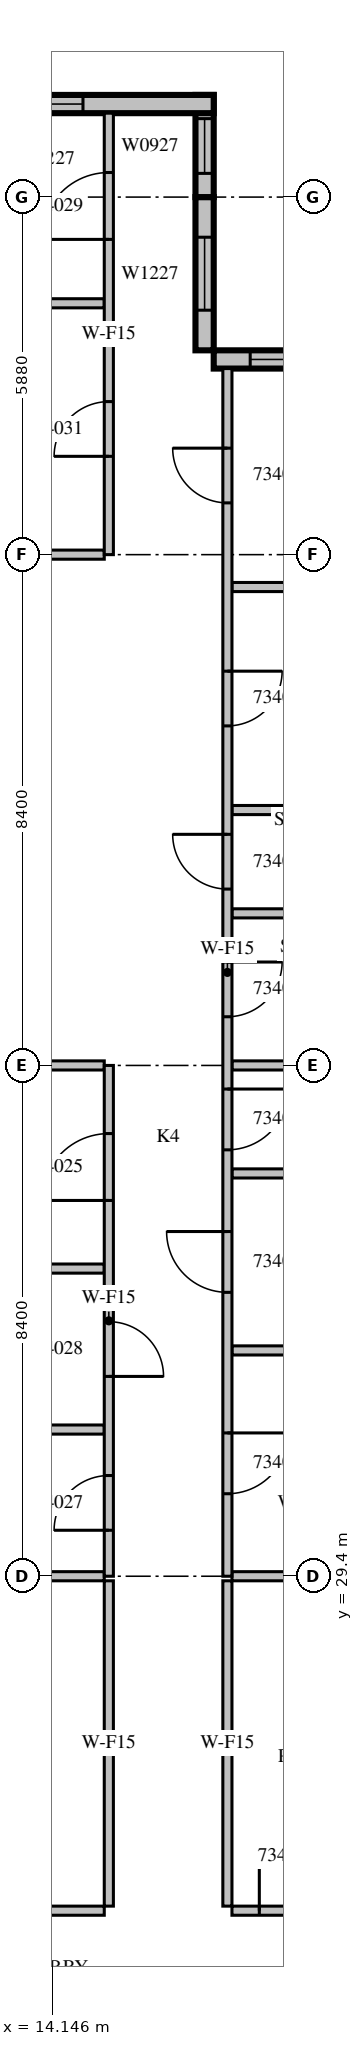
"""IFC4 building model, lengths in metres.
Left out: names, types, materials, properties, quantities, classifications, styles, units other than length and angle.
Written with IfcOpenShell. Run it as: python <this file> out.ifc"""

import sys

from ifc_helpers import new_model, si_unit, direction, frame, frame_2d, origin, place, context, subcontext, project, spatial, rectangle, extrude, source, transform, mapped, element, fill, save


model = new_model("IFC4")
c1 = context("Model", 3, precision=1e-05, world=origin(), true_north=direction((0.0, 1.0)))
c2 = subcontext(c1, "Body", "Model", "MODEL_VIEW")
j1 = project(units=[si_unit("LENGTHUNIT", "METRE"), si_unit("PLANEANGLEUNIT", "RADIAN")], contexts=[c1])
p1 = place(None, origin())
s1 = spatial("IfcSite", under=j1, at=p1, CompositionType="ELEMENT")
p2 = place(p1, origin())
s2 = spatial("IfcBuilding", under=s1, at=p2, CompositionType="ELEMENT")
p3 = place(p2, frame((0.0, 0.0, 153.9)))
s3 = spatial("IfcBuildingStorey", under=s2, at=p3, CompositionType="ELEMENT", Elevation=153.9)
m1 = source(origin(), c2, "Body", "SweptSolid", [
    extrude(rectangle(XDim=4.2, YDim=0.3, at=frame_2d((2.1, 0.0))), origin(), (0.0, 0.0, 1.0), 3.8),
])
p4 = place(p3, frame((21.0, 49.41, 0.0), z_axis=(0.0, 0.0, 1.0), x_axis=(-1.0, 0.0, 0.0)))
e1 = element("IfcWall", 1, at=p4, inside=s3, PredefinedType="STANDARD", context=c2, shape_type="MappedRepresentation", body=[
    mapped(m1, transform((0.0, 0.0, 0.0), scale=1.0)),
])
m2 = source(origin(), c2, "Body", "SweptSolid", [
    extrude(rectangle(XDim=3.0, YDim=2.7, at=frame_2d((1.5, 1.35))), frame((0.0, 0.16, 0.0), z_axis=(0.0, -1.0, 0.0), x_axis=(1.0, 0.0, 0.0)), (0.0, 0.0, 1.0), 0.32),
])
p5 = place(p4, frame((0.6, 0.0, 0.6)))
e2 = element("IfcOpeningElement", 2, at=p5, cuts=e1, PredefinedType="OPENING", context=c2, shape_type="MappedRepresentation", body=[
    mapped(m2, transform((0.0, 0.0, 0.0), scale=1.0)),
])
m3 = source(origin(), c2, "Body", "SweptSolid", [
    extrude(rectangle(XDim=2.52, YDim=0.3, at=frame_2d((1.26, 0.0))), origin(), (0.0, 0.0, 1.0), 3.8),
])
p6 = place(p3, frame((16.65, 49.56, 0.0), z_axis=(0.0, 0.0, 1.0), x_axis=(0.0, 1.0, 0.0)))
e3 = element("IfcWall", 3, at=p6, inside=s3, PredefinedType="STANDARD", context=c2, shape_type="MappedRepresentation", body=[
    mapped(m3, transform((0.0, 0.0, 0.0), scale=1.0)),
])
m4 = source(origin(), c2, "Body", "SweptSolid", [
    extrude(rectangle(XDim=1.2, YDim=2.7, at=frame_2d((0.6, 1.35))), frame((0.0, 0.16, 0.0), z_axis=(0.0, -1.0, 0.0), x_axis=(1.0, 0.0, 0.0)), (0.0, 0.0, 1.0), 0.32),
])
p7 = place(p6, frame((0.66, 0.0, 0.6)))
e4 = element("IfcOpeningElement", 4, at=p7, cuts=e3, PredefinedType="OPENING", context=c2, shape_type="MappedRepresentation", body=[
    mapped(m4, transform((0.0, 0.0, 0.0), scale=1.0)),
])
m5 = source(origin(), c2, "Body", "SweptSolid", [
    extrude(rectangle(XDim=1.68, YDim=0.3, at=frame_2d((0.84, 0.0))), origin(), (0.0, 0.0, 1.0), 3.8),
])
p8 = place(p3, frame((16.65, 52.08, 0.0), z_axis=(0.0, 0.0, 1.0), x_axis=(0.0, 1.0, 0.0)))
e5 = element("IfcWall", 5, at=p8, inside=s3, PredefinedType="STANDARD", context=c2, shape_type="MappedRepresentation", body=[
    mapped(m5, transform((0.0, 0.0, 0.0), scale=1.0)),
])
m6 = source(origin(), c2, "Body", "SweptSolid", [
    extrude(rectangle(XDim=0.9, YDim=2.7, at=frame_2d((0.45, 1.35))), frame((0.0, 0.16, 0.0), z_axis=(0.0, -1.0, 0.0), x_axis=(1.0, 0.0, 0.0)), (0.0, 0.0, 1.0), 0.32),
])
p9 = place(p8, frame((0.39, 0.0, 0.6)))
e6 = element("IfcOpeningElement", 6, at=p9, cuts=e5, PredefinedType="OPENING", context=c2, shape_type="MappedRepresentation", body=[
    mapped(m6, transform((0.0, 0.0, 0.0), scale=1.0)),
])
m7 = source(origin(), c2, "Body", "SweptSolid", [
    extrude(rectangle(XDim=10.5, YDim=0.3, at=frame_2d((5.25, 0.0))), origin(), (0.0, 0.0, 1.0), 3.8),
])
p10 = place(p3, frame((16.8, 53.61, 0.0), z_axis=(0.0, 0.0, 1.0), x_axis=(-1.0, 0.0, 0.0)))
e7 = element("IfcWall", 7, at=p10, inside=s3, PredefinedType="STANDARD", context=c2, shape_type="MappedRepresentation", body=[
    mapped(m7, transform((0.0, 0.0, 0.0), scale=1.0)),
])
p11 = place(p10, frame((2.15, 0.0, 0.6)))
e8 = element("IfcOpeningElement", 8, at=p11, cuts=e7, PredefinedType="OPENING", context=c2, shape_type="MappedRepresentation", body=[
    mapped(m4, transform((0.0, 0.0, 0.0), scale=1.0)),
])
m8 = source(origin(), c2, "Body", "SweptSolid", [
    extrude(rectangle(XDim=1.8, YDim=2.7, at=frame_2d((0.9, 1.35))), frame((0.0, 0.16, 0.0), z_axis=(0.0, -1.0, 0.0), x_axis=(1.0, 0.0, 0.0)), (0.0, 0.0, 1.0), 0.32),
])
p12 = place(p10, frame((8.025, 0.0, 0.6)))
e9 = element("IfcOpeningElement", 9, at=p12, cuts=e7, PredefinedType="OPENING", context=c2, shape_type="MappedRepresentation", body=[
    mapped(m8, transform((0.0, 0.0, 0.0), scale=1.0)),
])
m9 = source(origin(), c2, "Body", "SweptSolid", [
    extrude(rectangle(XDim=8.495, YDim=0.15, at=frame_2d((4.247, 0.0))), origin(), (0.0, 0.0, 1.0), 3.8),
])
p13 = place(p3, frame((6.505, 23.9, 0.0), z_axis=(0.0, 0.0, 1.0), x_axis=(1.0, 0.0, 0.0)))
e10 = element("IfcWall", 10, at=p13, inside=s3, PredefinedType="PARTITIONING", context=c2, shape_type="MappedRepresentation", body=[
    mapped(m9, transform((0.0, 0.0, 0.0), scale=1.0)),
])
m10 = source(origin(), c2, "Body", "SweptSolid", [
    extrude(rectangle(XDim=0.9, YDim=2.1, at=frame_2d((0.45, 1.05))), frame((0.0, 0.085, 0.0), z_axis=(0.0, -1.0, 0.0), x_axis=(1.0, 0.0, 0.0)), (0.0, 0.0, 1.0), 0.17),
])
p14 = place(p13, frame((1.045, 0.0, 0.0)))
e11 = element("IfcOpeningElement", 11, at=p14, cuts=e10, PredefinedType="OPENING", context=c2, shape_type="MappedRepresentation", body=[
    mapped(m10, transform((0.0, 0.0, 0.0), scale=1.0)),
])
p15 = place(p13, frame((6.12, 0.0, 0.0)))
e12 = element("IfcOpeningElement", 12, at=p15, cuts=e10, PredefinedType="OPENING", context=c2, shape_type="MappedRepresentation", body=[
    mapped(m10, transform((0.0, 0.0, 0.0), scale=1.0)),
])
m11 = source(origin(), c2, "Body", "SweptSolid", [
    extrude(rectangle(XDim=3.6, YDim=0.15, at=frame_2d((1.8, 0.0))), origin(), (0.0, 0.0, 1.0), 3.8),
])
p16 = place(p3, frame((17.1, 23.9, 0.0), z_axis=(0.0, 0.0, 1.0), x_axis=(1.0, 0.0, 0.0)))
e13 = element("IfcWall", 13, at=p16, inside=s3, PredefinedType="PARTITIONING", context=c2, shape_type="MappedRepresentation", body=[
    mapped(m11, transform((0.0, 0.0, 0.0), scale=1.0)),
])
p17 = place(p16, frame((0.45, 0.0, 0.0)))
e14 = element("IfcOpeningElement", 14, at=p17, cuts=e13, PredefinedType="OPENING", context=c2, shape_type="MappedRepresentation", body=[
    mapped(m10, transform((0.0, 0.0, 0.0), scale=1.0)),
])
m12 = source(origin(), c2, "Body", "SweptSolid", [
    extrude(rectangle(XDim=5.35, YDim=0.15, at=frame_2d((2.675, 0.0))), origin(), (0.0, 0.0, 1.0), 3.8),
])
for number, where, z_axis, x_axis in (
    (15, (15.075, 23.975, 0.0), (0.0, 0.0, 1.0), (0.0, 1.0, 0.0)),
    (16, (17.025, 29.325, 0.0), (0.0, 0.0, 1.0), (0.0, -1.0, 0.0)),
):
    element("IfcWall", number, at=place(p3, frame(where, z_axis=z_axis, x_axis=x_axis)), inside=s3, PredefinedType="PARTITIONING", context=c2, shape_type="MappedRepresentation", body=[
        mapped(m12, transform((0.0, 0.0, 0.0), scale=1.0)),
    ])
m13 = source(origin(), c2, "Body", "SweptSolid", [
    extrude(rectangle(XDim=3.976, YDim=0.15, at=frame_2d((1.988, 0.0))), origin(), (0.0, 0.0, 1.0), 3.8),
])
p18 = place(p3, frame((15.0, 29.4, 0.0), z_axis=(0.0, 0.0, 1.0), x_axis=(-1.0, 0.0, 0.0)))
e17 = element("IfcWall", 17, at=p18, inside=s3, PredefinedType="PARTITIONING", context=c2, shape_type="MappedRepresentation", body=[
    mapped(m13, transform((0.0, 0.0, 0.0), scale=1.0)),
])
m14 = source(origin(), c2, "Body", "SweptSolid", [
    extrude(rectangle(XDim=2.851, YDim=0.15, at=frame_2d((1.425, 0.0))), origin(), (0.0, 0.0, 1.0), 3.8),
])
p19 = place(p3, frame((19.951, 29.4, 0.0), z_axis=(0.0, 0.0, 1.0), x_axis=(-1.0, 0.0, 0.0)))
e18 = element("IfcWall", 18, at=p19, inside=s3, PredefinedType="PARTITIONING", context=c2, shape_type="MappedRepresentation", body=[
    mapped(m14, transform((0.0, 0.0, 0.0), scale=1.0)),
])
m15 = source(origin(), c2, "Body", "SweptSolid", [
    extrude(rectangle(XDim=3.825, YDim=0.15, at=frame_2d((1.913, 0.0))), origin(), (0.0, 0.0, 1.0), 3.8),
])
for number, where, z_axis, x_axis in (
    (19, (15.0, 31.812, 0.0), (0.0, 0.0, 1.0), (-1.0, 0.0, 0.0)),
    (20, (15.0, 34.459, 0.0), (0.0, 0.0, 1.0), (-1.0, 0.0, 0.0)),
    (21, (15.0, 37.8, 0.0), (0.0, 0.0, 1.0), (-1.0, 0.0, 0.0)),
    (22, (15.0, 50.334, 0.0), (0.0, 0.0, 1.0), (-1.0, 0.0, 0.0)),
    (23, (15.0, 46.2, 0.0), (0.0, 0.0, 1.0), (-1.0, 0.0, 0.0)),
):
    element("IfcWall", number, at=place(p3, frame(where, z_axis=z_axis, x_axis=x_axis)), inside=s3, PredefinedType="PARTITIONING", context=c2, shape_type="MappedRepresentation", body=[
        mapped(m15, transform((0.0, 0.0, 0.0), scale=1.0)),
    ])
for number, where, z_axis, x_axis in (
    (24, (17.1, 33.113, 0.0), (0.0, 0.0, 1.0), (1.0, 0.0, 0.0)),
    (25, (17.1, 36.024, 0.0), (0.0, 0.0, 1.0), (1.0, 0.0, 0.0)),
    (26, (17.1, 40.301, 0.0), (0.0, 0.0, 1.0), (1.0, 0.0, 0.0)),
    (27, (17.1, 45.667, 0.0), (0.0, 0.0, 1.0), (1.0, 0.0, 0.0)),
):
    element("IfcWall", number, at=place(p3, frame(where, z_axis=z_axis, x_axis=x_axis)), inside=s3, PredefinedType="PARTITIONING", context=c2, shape_type="MappedRepresentation", body=[
        mapped(m11, transform((0.0, 0.0, 0.0), scale=1.0)),
    ])
p20 = place(p3, frame((19.951, 37.8, 0.0), z_axis=(0.0, 0.0, 1.0), x_axis=(-1.0, 0.0, 0.0)))
e28 = element("IfcWall", 28, at=p20, inside=s3, PredefinedType="PARTITIONING", context=c2, shape_type="MappedRepresentation", body=[
    mapped(m14, transform((0.0, 0.0, 0.0), scale=1.0)),
])
p21 = place(p3, frame((20.7, 42.0, 0.0), z_axis=(0.0, 0.0, 1.0), x_axis=(-1.0, 0.0, 0.0)))
e29 = element("IfcWall", 29, at=p21, inside=s3, PredefinedType="PARTITIONING", context=c2, shape_type="MappedRepresentation", body=[
    mapped(m11, transform((0.0, 0.0, 0.0), scale=1.0)),
])
m16 = source(origin(), c2, "Body", "SweptSolid", [
    extrude(rectangle(XDim=8.4, YDim=0.15, at=frame_2d((4.2, 0.0))), origin(), (0.0, 0.0, 1.0), 3.8),
])
p22 = place(p3, frame((15.075, 29.4, 0.0), z_axis=(0.0, 0.0, 1.0), x_axis=(0.0, 1.0, 0.0)))
e30 = element("IfcWall", 30, at=p22, inside=s3, PredefinedType="PARTITIONING", context=c2, shape_type="MappedRepresentation", body=[
    mapped(m16, transform((0.0, 0.0, 0.0), scale=1.0)),
])
m17 = source(origin(), c2, "Body", "SweptSolid", [
    extrude(rectangle(XDim=1.1, YDim=2.1, at=frame_2d((0.55, 1.05))), frame((0.0, 0.085, 0.0), z_axis=(0.0, -1.0, 0.0), x_axis=(1.0, 0.0, 0.0)), (0.0, 0.0, 1.0), 0.17),
])
p23 = place(p22, frame((6.18, 0.0, 0.0)))
e31 = element("IfcOpeningElement", 31, at=p23, cuts=e30, PredefinedType="OPENING", context=c2, shape_type="MappedRepresentation", body=[
    mapped(m17, transform((0.0, 0.0, 0.0), scale=1.0)),
])
p24 = place(p22, frame((0.756, 0.0, 0.0)))
e32 = element("IfcOpeningElement", 32, at=p24, cuts=e30, PredefinedType="OPENING", context=c2, shape_type="MappedRepresentation", body=[
    mapped(m10, transform((0.0, 0.0, 0.0), scale=1.0)),
])
p25 = place(p22, frame((3.286, 0.0, 0.0)))
e33 = element("IfcOpeningElement", 33, at=p25, cuts=e30, PredefinedType="OPENING", context=c2, shape_type="MappedRepresentation", body=[
    mapped(m10, transform((0.0, 0.0, 0.0), scale=1.0)),
])
m18 = source(origin(), c2, "Body", "SweptSolid", [
    extrude(rectangle(XDim=7.26, YDim=0.15, at=frame_2d((3.63, 0.0))), origin(), (0.0, 0.0, 1.0), 3.8),
])
p26 = place(p3, frame((15.075, 46.2, 0.0), z_axis=(0.0, 0.0, 1.0), x_axis=(0.0, 1.0, 0.0)))
e34 = element("IfcWall", 34, at=p26, inside=s3, PredefinedType="PARTITIONING", context=c2, shape_type="MappedRepresentation", body=[
    mapped(m18, transform((0.0, 0.0, 0.0), scale=1.0)),
])
p27 = place(p26, frame((5.184, 0.0, 0.0)))
e35 = element("IfcOpeningElement", 35, at=p27, cuts=e34, PredefinedType="OPENING", context=c2, shape_type="MappedRepresentation", body=[
    mapped(m17, transform((0.0, 0.0, 0.0), scale=1.0)),
])
p28 = place(p26, frame((1.617, 0.0, 0.0)))
e36 = element("IfcOpeningElement", 36, at=p28, cuts=e34, PredefinedType="OPENING", context=c2, shape_type="MappedRepresentation", body=[
    mapped(m10, transform((0.0, 0.0, 0.0), scale=1.0)),
])
m19 = source(origin(), c2, "Body", "SweptSolid", [
    extrude(rectangle(XDim=19.86, YDim=0.15, at=frame_2d((9.93, 0.0))), origin(), (0.0, 0.0, 1.0), 3.8),
])
p29 = place(p3, frame((17.025, 49.26, 0.0), z_axis=(0.0, 0.0, 1.0), x_axis=(0.0, -1.0, 0.0)))
e37 = element("IfcWall", 37, at=p29, inside=s3, PredefinedType="PARTITIONING", context=c2, shape_type="MappedRepresentation", body=[
    mapped(m19, transform((0.0, 0.0, 0.0), scale=1.0)),
])
m20 = source(origin(), c2, "Body", "SweptSolid", [
    extrude(rectangle(XDim=1.0, YDim=2.1, at=frame_2d((0.5, 1.05))), frame((0.0, 0.085, 0.0), z_axis=(0.0, -1.0, 0.0), x_axis=(1.0, 0.0, 0.0)), (0.0, 0.0, 1.0), 0.17),
])
p30 = place(p29, frame((17.503, 0.0, 0.0)))
e38 = element("IfcOpeningElement", 38, at=p30, cuts=e37, PredefinedType="OPENING", context=c2, shape_type="MappedRepresentation", body=[
    mapped(m20, transform((0.0, 0.0, 0.0), scale=1.0)),
])
p31 = place(p29, frame((14.191, 0.0, 0.0)))
e39 = element("IfcOpeningElement", 39, at=p31, cuts=e37, PredefinedType="OPENING", context=c2, shape_type="MappedRepresentation", body=[
    mapped(m20, transform((0.0, 0.0, 0.0), scale=1.0)),
])
p32 = place(p29, frame((11.848, 0.0, 0.0)))
e40 = element("IfcOpeningElement", 40, at=p32, cuts=e37, PredefinedType="OPENING", context=c2, shape_type="MappedRepresentation", body=[
    mapped(m20, transform((0.0, 0.0, 0.0), scale=1.0)),
])
p33 = place(p29, frame((9.759, 0.0, 0.0)))
e41 = element("IfcOpeningElement", 41, at=p33, cuts=e37, PredefinedType="OPENING", context=c2, shape_type="MappedRepresentation", body=[
    mapped(m10, transform((0.0, 0.0, 0.0), scale=1.0)),
])
p34 = place(p29, frame((7.659, 0.0, 0.0)))
e42 = element("IfcOpeningElement", 42, at=p34, cuts=e37, PredefinedType="OPENING", context=c2, shape_type="MappedRepresentation", body=[
    mapped(m10, transform((0.0, 0.0, 0.0), scale=1.0)),
])
p35 = place(p29, frame((4.976, 0.0, 0.0)))
e43 = element("IfcOpeningElement", 43, at=p35, cuts=e37, PredefinedType="OPENING", context=c2, shape_type="MappedRepresentation", body=[
    mapped(m10, transform((0.0, 0.0, 0.0), scale=1.0)),
])
p36 = place(p29, frame((1.309, 0.0, 0.0)))
e44 = element("IfcOpeningElement", 44, at=p36, cuts=e37, PredefinedType="OPENING", context=c2, shape_type="MappedRepresentation", body=[
    mapped(m10, transform((0.0, 0.0, 0.0), scale=1.0)),
])
m21 = source(origin(), c2, "Body", "SweptSolid", [
    extrude(rectangle(XDim=3.0, YDim=2.7, at=frame_2d((1.5, 1.35))), frame((0.0, 0.03, 0.0), z_axis=(0.0, -1.0, 0.0), x_axis=(1.0, 0.0, 0.0)), (0.0, 0.0, 1.0), 0.06),
])
p37 = place(p5, origin())
e45 = element("IfcWindow", 45, at=p37, inside=s3, PartitioningType="SINGLE_PANEL", PredefinedType="WINDOW", context=c2, shape_type="MappedRepresentation", body=[
    mapped(m21, transform((0.0, 0.0, 0.0), scale=1.0)),
])
fill(e2, e45)
m22 = source(origin(), c2, "Body", "SweptSolid", [
    extrude(rectangle(XDim=1.2, YDim=2.7, at=frame_2d((0.6, 1.35))), frame((0.0, 0.03, 0.0), z_axis=(0.0, -1.0, 0.0), x_axis=(1.0, 0.0, 0.0)), (0.0, 0.0, 1.0), 0.06),
])
p38 = place(p7, origin())
e46 = element("IfcWindow", 46, at=p38, inside=s3, PartitioningType="SINGLE_PANEL", PredefinedType="WINDOW", context=c2, shape_type="MappedRepresentation", body=[
    mapped(m22, transform((0.0, 0.0, 0.0), scale=1.0)),
])
fill(e4, e46)
m23 = source(origin(), c2, "Body", "SweptSolid", [
    extrude(rectangle(XDim=0.9, YDim=2.7, at=frame_2d((0.45, 1.35))), frame((0.0, 0.03, 0.0), z_axis=(0.0, -1.0, 0.0), x_axis=(1.0, 0.0, 0.0)), (0.0, 0.0, 1.0), 0.06),
])
p39 = place(p9, origin())
e47 = element("IfcWindow", 47, at=p39, inside=s3, PartitioningType="SINGLE_PANEL", PredefinedType="WINDOW", context=c2, shape_type="MappedRepresentation", body=[
    mapped(m23, transform((0.0, 0.0, 0.0), scale=1.0)),
])
fill(e6, e47)
p40 = place(p11, origin())
e48 = element("IfcWindow", 48, at=p40, inside=s3, PartitioningType="SINGLE_PANEL", PredefinedType="WINDOW", context=c2, shape_type="MappedRepresentation", body=[
    mapped(m22, transform((0.0, 0.0, 0.0), scale=1.0)),
])
fill(e8, e48)
m24 = source(origin(), c2, "Body", "SweptSolid", [
    extrude(rectangle(XDim=0.9, YDim=2.1, at=frame_2d((0.45, 1.05))), frame((0.0, 0.025, 0.0), z_axis=(0.0, -1.0, 0.0), x_axis=(1.0, 0.0, 0.0)), (0.0, 0.0, 1.0), 0.05),
])
p41 = place(p17, origin())
e49 = element("IfcDoor", 49, at=p41, inside=s3, OperationType="SINGLE_SWING_LEFT", PredefinedType="DOOR", context=c2, shape_type="MappedRepresentation", body=[
    mapped(m24, transform((0.0, 0.0, 0.0), scale=1.0)),
])
fill(e14, e49)
m25 = source(origin(), c2, "Body", "SweptSolid", [
    extrude(rectangle(XDim=1.1, YDim=2.1, at=frame_2d((0.55, 1.05))), frame((0.0, 0.025, 0.0), z_axis=(0.0, -1.0, 0.0), x_axis=(1.0, 0.0, 0.0)), (0.0, 0.0, 1.0), 0.05),
])
p42 = place(p23, origin())
e50 = element("IfcDoor", 50, at=p42, inside=s3, OperationType="SINGLE_SWING_LEFT", PredefinedType="DOOR", context=c2, shape_type="MappedRepresentation", body=[
    mapped(m25, transform((0.0, 0.0, 0.0), scale=1.0)),
])
fill(e31, e50)
p43 = place(p24, origin())
e51 = element("IfcDoor", 51, at=p43, inside=s3, OperationType="SINGLE_SWING_LEFT", PredefinedType="DOOR", context=c2, shape_type="MappedRepresentation", body=[
    mapped(m24, transform((0.0, 0.0, 0.0), scale=1.0)),
])
fill(e32, e51)
p44 = place(p25, origin())
e52 = element("IfcDoor", 52, at=p44, inside=s3, OperationType="SINGLE_SWING_RIGHT", PredefinedType="DOOR", context=c2, shape_type="MappedRepresentation", body=[
    mapped(m24, transform((0.0, 0.0, 0.0), scale=1.0)),
])
fill(e33, e52)
p45 = place(p27, origin())
e53 = element("IfcDoor", 53, at=p45, inside=s3, OperationType="SINGLE_SWING_LEFT", PredefinedType="DOOR", context=c2, shape_type="MappedRepresentation", body=[
    mapped(m25, transform((0.0, 0.0, 0.0), scale=1.0)),
])
fill(e35, e53)
p46 = place(p28, origin())
e54 = element("IfcDoor", 54, at=p46, inside=s3, OperationType="SINGLE_SWING_LEFT", PredefinedType="DOOR", context=c2, shape_type="MappedRepresentation", body=[
    mapped(m24, transform((0.0, 0.0, 0.0), scale=1.0)),
])
fill(e36, e54)
m26 = source(origin(), c2, "Body", "SweptSolid", [
    extrude(rectangle(XDim=1.0, YDim=2.1, at=frame_2d((0.5, 1.05))), frame((0.0, 0.025, 0.0), z_axis=(0.0, -1.0, 0.0), x_axis=(1.0, 0.0, 0.0)), (0.0, 0.0, 1.0), 0.05),
])
p47 = place(p30, origin())
e55 = element("IfcDoor", 55, at=p47, inside=s3, OperationType="SINGLE_SWING_LEFT", PredefinedType="DOOR", context=c2, shape_type="MappedRepresentation", body=[
    mapped(m26, transform((0.0, 0.0, 0.0), scale=1.0)),
])
fill(e38, e55)
p48 = place(p31, origin())
e56 = element("IfcDoor", 56, at=p48, inside=s3, OperationType="SINGLE_SWING_RIGHT", PredefinedType="DOOR", context=c2, shape_type="MappedRepresentation", body=[
    mapped(m26, transform((0.0, 0.0, 0.0), scale=1.0)),
])
fill(e39, e56)
p49 = place(p32, origin())
e57 = element("IfcDoor", 57, at=p49, inside=s3, OperationType="SINGLE_SWING_LEFT", PredefinedType="DOOR", context=c2, shape_type="MappedRepresentation", body=[
    mapped(m26, transform((0.0, 0.0, 0.0), scale=1.0)),
])
fill(e40, e57)
p50 = place(p33, origin())
e58 = element("IfcDoor", 58, at=p50, inside=s3, OperationType="SINGLE_SWING_LEFT", PredefinedType="DOOR", context=c2, shape_type="MappedRepresentation", body=[
    mapped(m24, transform((0.0, 0.0, 0.0), scale=1.0)),
])
fill(e41, e58)
p51 = place(p34, origin())
e59 = element("IfcDoor", 59, at=p51, inside=s3, OperationType="SINGLE_SWING_RIGHT", PredefinedType="DOOR", context=c2, shape_type="MappedRepresentation", body=[
    mapped(m24, transform((0.0, 0.0, 0.0), scale=1.0)),
])
fill(e42, e59)
p52 = place(p35, origin())
e60 = element("IfcDoor", 60, at=p52, inside=s3, OperationType="SINGLE_SWING_LEFT", PredefinedType="DOOR", context=c2, shape_type="MappedRepresentation", body=[
    mapped(m24, transform((0.0, 0.0, 0.0), scale=1.0)),
])
fill(e43, e60)
p53 = place(p36, origin())
e61 = element("IfcDoor", 61, at=p53, inside=s3, OperationType="SINGLE_SWING_RIGHT", PredefinedType="DOOR", context=c2, shape_type="MappedRepresentation", body=[
    mapped(m24, transform((0.0, 0.0, 0.0), scale=1.0)),
])
fill(e44, e61)
save(model, sys.argv[1])
